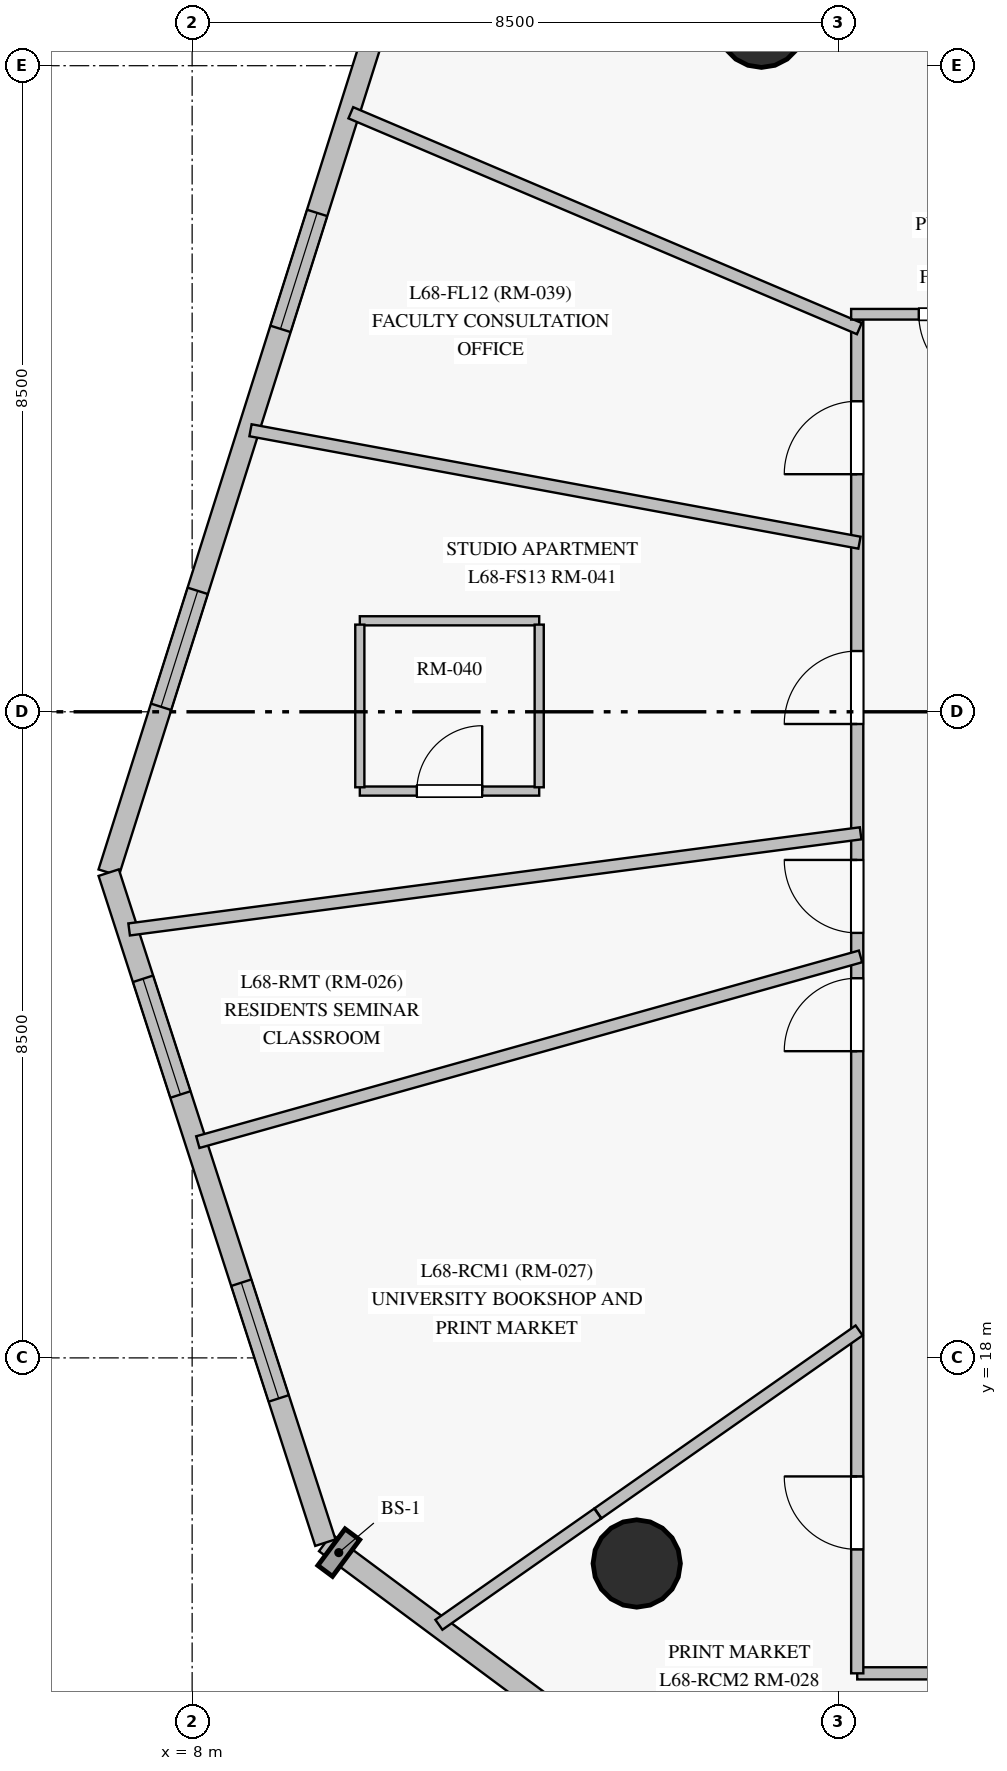
"""IFC4 building model, lengths in metres.
Left out: names, types, materials, properties, quantities, classifications, styles, units other than length and angle.
Written with IfcOpenShell. Run it as: python <this file> out.ifc"""

import sys

from ifc_helpers import new_model, si_unit, direction, frame, frame_2d, origin, origin_with_axes, origin_2d, place, context, subcontext, project, spatial, rectangle, circle, extrude, source, transform, mapped, element, fill, save


model = new_model("IFC4")
c1 = context("Model", 3, precision=1e-05, world=origin(), true_north=direction((0.0, 1.0)))
c2 = subcontext(c1, "Body", "Model", "MODEL_VIEW")
j1 = project(units=[si_unit("LENGTHUNIT", "METRE"), si_unit("PLANEANGLEUNIT", "RADIAN")], contexts=[c1])
p1 = place(None, origin())
s1 = spatial("IfcSite", under=j1, at=p1, CompositionType="ELEMENT")
p2 = place(p1, origin())
s2 = spatial("IfcBuilding", under=s1, at=p2, CompositionType="ELEMENT")
p3 = place(p2, frame((0.0, 0.0, 232.15)))
s3 = spatial("IfcBuildingStorey", under=s2, at=p3, CompositionType="ELEMENT", Elevation=232.15)
m1 = source(origin_with_axes(), c2, "Body", "SweptSolid", [
    extrude(circle(Radius=0.575, at=origin_2d()), origin(), (0.0, 0.0, 1.0), 3.05),
])
for number, where, z_axis, x_axis in (
    (1, (15.49, 35.552, 0.0), (0.0, 0.0, 1.0), (1.0, 0.0, 0.0)),
    (2, (13.849, 15.295, 0.0), (0.0, 0.0, 1.0), (1.0, 0.0, 0.0)),
):
    element("IfcColumn", number, at=place(p3, frame(where, z_axis=z_axis, x_axis=x_axis)), inside=s3, PredefinedType="COLUMN", context=c2, shape_type="MappedRepresentation", body=[
        mapped(m1, transform((0.0, 0.0, 0.0), scale=1.0)),
    ])
p4 = place(p3, frame((9.752, 15.569, 0.0), z_axis=(0.0, 0.0, 1.0), x_axis=(0.802568222185, -0.596560347944, 0.0)))
e3 = element("IfcWall", 3, at=p4, inside=s3, PredefinedType="SOLIDWALL", context=c2, shape_type="SweptSolid", body=[
    extrude(rectangle(XDim=12.342, YDim=0.28, at=frame_2d((6.171, 0.0))), origin(), (0.0, 0.0, 1.0), 2.85),
])
p5 = place(p4, frame((4.531, 0.0, 0.85)))
e4 = element("IfcOpeningElement", 4, at=p5, cuts=e3, PredefinedType="OPENING", context=c2, shape_type="SweptSolid", body=[
    extrude(rectangle(XDim=1.6, YDim=1.6, at=frame_2d((0.8, 0.8))), frame((0.0, 0.15, 0.0), z_axis=(0.0, -1.0, 0.0), x_axis=(1.0, 0.0, 0.0)), (0.0, 0.0, 1.0), 0.3),
])
p6 = place(p4, frame((9.744, 0.0, 0.85)))
e5 = element("IfcOpeningElement", 5, at=p6, cuts=e3, PredefinedType="OPENING", context=c2, shape_type="SweptSolid", body=[
    extrude(rectangle(XDim=1.6, YDim=1.6, at=frame_2d((0.8, 0.8))), frame((0.0, 0.15, 0.0), z_axis=(0.0, -1.0, 0.0), x_axis=(1.0, 0.0, 0.0)), (0.0, 0.0, 1.0), 0.3),
])
p7 = place(p3, frame((10.621, 36.152, 0.0), z_axis=(0.0, 0.0, 1.0), x_axis=(-0.301293253661, -0.953531528214, 0.0)))
e6 = element("IfcWall", 6, at=p7, inside=s3, PredefinedType="SOLIDWALL", context=c2, shape_type="SweptSolid", body=[
    extrude(rectangle(XDim=12.342, YDim=0.28, at=frame_2d((6.171, 0.0))), origin(), (0.0, 0.0, 1.0), 2.85),
])
p8 = place(p7, frame((3.239, 0.0, 0.85)))
e7 = element("IfcOpeningElement", 7, at=p8, cuts=e6, PredefinedType="OPENING", context=c2, shape_type="SweptSolid", body=[
    extrude(rectangle(XDim=1.6, YDim=1.6, at=frame_2d((0.8, 0.8))), frame((0.0, 0.15, 0.0), z_axis=(0.0, -1.0, 0.0), x_axis=(1.0, 0.0, 0.0)), (0.0, 0.0, 1.0), 0.3),
])
p9 = place(p7, frame((8.454, 0.0, 0.85)))
e8 = element("IfcOpeningElement", 8, at=p9, cuts=e6, PredefinedType="OPENING", context=c2, shape_type="SweptSolid", body=[
    extrude(rectangle(XDim=1.6, YDim=1.6, at=frame_2d((0.8, 0.8))), frame((0.0, 0.15, 0.0), z_axis=(0.0, -1.0, 0.0), x_axis=(1.0, 0.0, 0.0)), (0.0, 0.0, 1.0), 0.3),
])
p10 = place(p3, frame((6.902, 24.384, 0.0), z_axis=(0.0, 0.0, 1.0), x_axis=(0.307684157232, -0.951488549268, 0.0)))
e9 = element("IfcWall", 9, at=p10, inside=s3, PredefinedType="SOLIDWALL", context=c2, shape_type="SweptSolid", body=[
    extrude(rectangle(XDim=9.264, YDim=0.28, at=frame_2d((4.632, 0.0))), origin(), (0.0, 0.0, 1.0), 2.85),
])
p11 = place(p10, frame((1.468, 0.0, 0.85)))
e10 = element("IfcOpeningElement", 10, at=p11, cuts=e9, PredefinedType="OPENING", context=c2, shape_type="SweptSolid", body=[
    extrude(rectangle(XDim=1.6, YDim=1.6, at=frame_2d((0.8, 0.8))), frame((0.0, 0.15, 0.0), z_axis=(0.0, -1.0, 0.0), x_axis=(1.0, 0.0, 0.0)), (0.0, 0.0, 1.0), 0.3),
])
p12 = place(p10, frame((5.67, 0.0, 0.85)))
e11 = element("IfcOpeningElement", 11, at=p12, cuts=e9, PredefinedType="OPENING", context=c2, shape_type="SweptSolid", body=[
    extrude(rectangle(XDim=1.6, YDim=1.6, at=frame_2d((0.8, 0.8))), frame((0.0, 0.15, 0.0), z_axis=(0.0, -1.0, 0.0), x_axis=(1.0, 0.0, 0.0)), (0.0, 0.0, 1.0), 0.3),
])
p13 = place(p3, frame((39.82, 13.85, 0.0), z_axis=(0.0, 0.0, 1.0), x_axis=(-1.0, 0.0, 0.0)))
e12 = element("IfcWall", 12, at=p13, inside=s3, PredefinedType="PARTITIONING", context=c2, shape_type="SweptSolid", body=[
    extrude(rectangle(XDim=23.07, YDim=0.16, at=frame_2d((11.535, 0.0))), origin(), (0.0, 0.0, 1.0), 2.3),
])
p14 = place(p13, frame((14.423, 0.0, 0.0)))
e13 = element("IfcOpeningElement", 13, at=p14, cuts=e12, PredefinedType="OPENING", context=c2, shape_type="SweptSolid", body=[
    extrude(rectangle(XDim=0.96, YDim=2.15, at=frame_2d((0.48, 1.075))), frame((0.0, 0.09, 0.0), z_axis=(0.0, -1.0, 0.0), x_axis=(1.0, 0.0, 0.0)), (0.0, 0.0, 1.0), 0.18),
])
p15 = place(p13, frame((10.985, 0.0, 0.0)))
e14 = element("IfcOpeningElement", 14, at=p15, cuts=e12, PredefinedType="OPENING", context=c2, shape_type="SweptSolid", body=[
    extrude(rectangle(XDim=0.96, YDim=2.15, at=frame_2d((0.48, 1.075))), frame((0.0, 0.09, 0.0), z_axis=(0.0, -1.0, 0.0), x_axis=(1.0, 0.0, 0.0)), (0.0, 0.0, 1.0), 0.18),
])
p16 = place(p13, frame((5.255, 0.0, 0.0)))
e15 = element("IfcOpeningElement", 15, at=p16, cuts=e12, PredefinedType="OPENING", context=c2, shape_type="SweptSolid", body=[
    extrude(rectangle(XDim=0.96, YDim=2.15, at=frame_2d((0.48, 1.075))), frame((0.0, 0.09, 0.0), z_axis=(0.0, -1.0, 0.0), x_axis=(1.0, 0.0, 0.0)), (0.0, 0.0, 1.0), 0.18),
])
p17 = place(p3, frame((16.75, 13.85, 0.0), z_axis=(0.0, 0.0, 1.0), x_axis=(0.0, 1.0, 0.0)))
e16 = element("IfcWall", 16, at=p17, inside=s3, PredefinedType="PARTITIONING", context=c2, shape_type="SweptSolid", body=[
    extrude(rectangle(XDim=17.8, YDim=0.16, at=frame_2d((8.9, 0.0))), origin(), (0.0, 0.0, 1.0), 2.45),
])
p18 = place(p17, frame((12.49, 0.0, 0.0)))
e17 = element("IfcOpeningElement", 17, at=p18, cuts=e16, PredefinedType="OPENING", context=c2, shape_type="SweptSolid", body=[
    extrude(rectangle(XDim=0.96, YDim=2.15, at=frame_2d((0.48, 1.075))), frame((0.0, 0.09, 0.0), z_axis=(0.0, -1.0, 0.0), x_axis=(1.0, 0.0, 0.0)), (0.0, 0.0, 1.0), 0.18),
])
p19 = place(p17, frame((9.741, 0.0, 0.0)))
e18 = element("IfcOpeningElement", 18, at=p19, cuts=e16, PredefinedType="OPENING", context=c2, shape_type="SweptSolid", body=[
    extrude(rectangle(XDim=0.96, YDim=2.15, at=frame_2d((0.48, 1.075))), frame((0.0, 0.09, 0.0), z_axis=(0.0, -1.0, 0.0), x_axis=(1.0, 0.0, 0.0)), (0.0, 0.0, 1.0), 0.18),
])
p20 = place(p17, frame((8.185, 0.0, 0.0)))
e19 = element("IfcOpeningElement", 19, at=p20, cuts=e16, PredefinedType="OPENING", context=c2, shape_type="SweptSolid", body=[
    extrude(rectangle(XDim=0.96, YDim=2.15, at=frame_2d((0.48, 1.075))), frame((0.0, 0.09, 0.0), z_axis=(0.0, -1.0, 0.0), x_axis=(1.0, 0.0, 0.0)), (0.0, 0.0, 1.0), 0.18),
])
p21 = place(p17, frame((1.631, 0.0, 0.0)))
e20 = element("IfcOpeningElement", 20, at=p21, cuts=e16, PredefinedType="OPENING", context=c2, shape_type="SweptSolid", body=[
    extrude(rectangle(XDim=0.96, YDim=2.15, at=frame_2d((0.48, 1.075))), frame((0.0, 0.09, 0.0), z_axis=(0.0, -1.0, 0.0), x_axis=(1.0, 0.0, 0.0)), (0.0, 0.0, 1.0), 0.18),
])
p22 = place(p17, frame((15.776, 0.0, 0.0)))
e21 = element("IfcOpeningElement", 21, at=p22, cuts=e16, PredefinedType="OPENING", context=c2, shape_type="SweptSolid", body=[
    extrude(rectangle(XDim=0.96, YDim=2.15, at=frame_2d((0.48, 1.075))), frame((0.0, 0.09, 0.0), z_axis=(0.0, -1.0, 0.0), x_axis=(1.0, 0.0, 0.0)), (0.0, 0.0, 1.0), 0.18),
])
p23 = place(p3, frame((7.171, 23.637, 0.0), z_axis=(0.0, 0.0, 1.0), x_axis=(0.991475685251, 0.130291847623, 0.0)))
e22 = element("IfcWall", 22, at=p23, inside=s3, PredefinedType="PARTITIONING", context=c2, shape_type="SweptSolid", body=[
    extrude(rectangle(XDim=9.706, YDim=0.16, at=frame_2d((4.853, 0.0))), origin(), (0.0, 0.0, 1.0), 2.85),
])
p24 = place(p3, frame((16.793, 23.282, 0.0), z_axis=(0.0, 0.0, 1.0), x_axis=(-0.962908551291, -0.269827948609, 0.0)))
e23 = element("IfcWall", 23, at=p24, inside=s3, PredefinedType="PARTITIONING", context=c2, shape_type="SweptSolid", body=[
    extrude(rectangle(XDim=9.054, YDim=0.16, at=frame_2d((4.527, 0.0))), origin(), (0.0, 0.0, 1.0), 2.85),
])
p25 = place(p3, frame((16.78, 28.725, 0.0), z_axis=(0.0, 0.0, 1.0), x_axis=(-0.983383991092, 0.181537671198, 0.0)))
e24 = element("IfcWall", 24, at=p25, inside=s3, PredefinedType="PARTITIONING", context=c2, shape_type="SweptSolid", body=[
    extrude(rectangle(XDim=8.147, YDim=0.16, at=frame_2d((4.073, 0.0))), origin(), (0.0, 0.0, 1.0), 2.85),
])
p26 = place(p3, frame((16.778, 31.541, 0.0), z_axis=(0.0, 0.0, 1.0), x_axis=(-0.920503444572, 0.390734447588, 0.0)))
e25 = element("IfcWall", 25, at=p26, inside=s3, PredefinedType="PARTITIONING", context=c2, shape_type="SweptSolid", body=[
    extrude(rectangle(XDim=7.268, YDim=0.16, at=frame_2d((3.634, 0.0))), origin(), (0.0, 0.0, 1.0), 2.85),
])
p27 = place(p3, frame((19.373, 13.875, 0.0), z_axis=(0.0, 0.0, 1.0), x_axis=(-0.582738076312, -0.812660036188, 0.0)))
e26 = element("IfcWall", 26, at=p27, inside=s3, PredefinedType="PARTITIONING", context=c2, shape_type="SweptSolid", body=[
    extrude(rectangle(XDim=4.354, YDim=0.16, at=frame_2d((2.177, 0.0))), origin(), (0.0, 0.0, 1.0), 2.85),
])
p28 = place(p3, frame((16.775, 18.361, 0.0), z_axis=(0.0, 0.0, 1.0), x_axis=(-0.819095148896, -0.573657682816, 0.0)))
e27 = element("IfcWall", 27, at=p28, inside=s3, PredefinedType="PARTITIONING", context=c2, shape_type="SweptSolid", body=[
    extrude(rectangle(XDim=4.194, YDim=0.16, at=frame_2d((2.097, 0.0))), origin(), (0.0, 0.0, 1.0), 2.85),
])
p29 = place(p3, frame((19.42, 31.73, 0.0), z_axis=(0.0, 0.0, 1.0), x_axis=(-1.0, 0.0, 0.0)))
e28 = element("IfcWall", 28, at=p29, inside=s3, PredefinedType="PARTITIONING", context=c2, shape_type="SweptSolid", body=[
    extrude(rectangle(XDim=2.75, YDim=0.14, at=frame_2d((1.375, 0.0))), origin(), (0.0, 0.0, 1.0), 2.85),
])
p30 = place(p29, frame((0.9, 0.0, 0.0)))
e29 = element("IfcOpeningElement", 29, at=p30, cuts=e28, PredefinedType="OPENING", context=c2, shape_type="SweptSolid", body=[
    extrude(rectangle(XDim=0.96, YDim=2.15, at=frame_2d((0.48, 1.075))), frame((0.0, 0.08, 0.0), z_axis=(0.0, -1.0, 0.0), x_axis=(1.0, 0.0, 0.0)), (0.0, 0.0, 1.0), 0.16),
])
p31 = place(p3, frame((10.206, 25.457, 0.0), z_axis=(0.0, 0.0, 1.0), x_axis=(1.0, 0.0, 0.0)))
e30 = element("IfcWall", 30, at=p31, inside=s3, PredefinedType="PARTITIONING", context=c2, shape_type="SweptSolid", body=[
    extrude(rectangle(XDim=2.36, YDim=0.12, at=frame_2d((1.18, 0.0))), origin(), (0.0, 0.0, 1.0), 2.85),
])
p32 = place(p31, frame((0.75, 0.0, 0.0)))
e31 = element("IfcOpeningElement", 31, at=p32, cuts=e30, PredefinedType="OPENING", context=c2, shape_type="SweptSolid", body=[
    extrude(rectangle(XDim=0.86, YDim=2.1, at=frame_2d((0.43, 1.05))), frame((0.0, 0.07, 0.0), z_axis=(0.0, -1.0, 0.0), x_axis=(1.0, 0.0, 0.0)), (0.0, 0.0, 1.0), 0.14),
])
p33 = place(p3, frame((12.566, 27.697, 0.0), z_axis=(0.0, 0.0, 1.0), x_axis=(-1.0, 0.0, 0.0)))
e32 = element("IfcWall", 32, at=p33, inside=s3, PredefinedType="PARTITIONING", context=c2, shape_type="SweptSolid", body=[
    extrude(rectangle(XDim=2.36, YDim=0.12, at=frame_2d((1.18, 0.0))), origin(), (0.0, 0.0, 1.0), 2.85),
])
p34 = place(p3, frame((13.335, 15.952, 0.0), z_axis=(0.0, 0.0, 1.0), x_axis=(-0.819060984625, -0.573706461063, 0.0)))
e33 = element("IfcWall", 33, at=p34, inside=s3, PredefinedType="PARTITIONING", context=c2, shape_type="SweptSolid", body=[
    extrude(rectangle(XDim=2.55, YDim=0.16, at=frame_2d((1.275, 0.0))), origin(), (0.0, 0.0, 1.0), 2.85),
])
for number, where, z_axis, x_axis in (
    (34, (12.566, 25.507, 0.0), (0.0, 0.0, 1.0), (0.0, 1.0, 0.0)),
    (35, (10.206, 27.647, 0.0), (0.0, 0.0, 1.0), (0.0, -1.0, 0.0)),
):
    element("IfcWall", number, at=place(p3, frame(where, z_axis=z_axis, x_axis=x_axis)), inside=s3, PredefinedType="PARTITIONING", context=c2, shape_type="SweptSolid", body=[
        extrude(rectangle(XDim=2.14, YDim=0.12, at=frame_2d((1.07, 0.0))), origin(), (0.0, 0.0, 1.0), 2.85),
    ])
m2 = source(origin_with_axes(), c2, "Body", "SweptSolid", [
    extrude(rectangle(XDim=1.6, YDim=1.6, at=frame_2d((0.8, 0.8))), frame((0.0, 0.03, 0.0), z_axis=(0.0, -1.0, 0.0), x_axis=(1.0, 0.0, 0.0)), (0.0, 0.0, 1.0), 0.06),
])
p35 = place(p8, origin())
e36 = element("IfcWindow", 36, at=p35, inside=s3, PartitioningType="SINGLE_PANEL", PredefinedType="WINDOW", context=c2, shape_type="MappedRepresentation", body=[
    mapped(m2, transform((0.0, 0.0, 0.0), scale=1.0)),
])
fill(e7, e36)
p36 = place(p9, origin())
e37 = element("IfcWindow", 37, at=p36, inside=s3, PartitioningType="SINGLE_PANEL", PredefinedType="WINDOW", context=c2, shape_type="MappedRepresentation", body=[
    mapped(m2, transform((0.0, 0.0, 0.0), scale=1.0)),
])
fill(e8, e37)
p37 = place(p11, origin())
e38 = element("IfcWindow", 38, at=p37, inside=s3, PartitioningType="SINGLE_PANEL", PredefinedType="WINDOW", context=c2, shape_type="MappedRepresentation", body=[
    mapped(m2, transform((0.0, 0.0, 0.0), scale=1.0)),
])
fill(e10, e38)
p38 = place(p12, origin())
e39 = element("IfcWindow", 39, at=p38, inside=s3, PartitioningType="SINGLE_PANEL", PredefinedType="WINDOW", context=c2, shape_type="MappedRepresentation", body=[
    mapped(m2, transform((0.0, 0.0, 0.0), scale=1.0)),
])
fill(e11, e39)
m3 = source(origin_with_axes(), c2, "Body", "SweptSolid", [
    extrude(rectangle(XDim=0.96, YDim=2.15, at=frame_2d((0.48, 1.075))), frame((0.0, 0.025, 0.0), z_axis=(0.0, -1.0, 0.0), x_axis=(1.0, 0.0, 0.0)), (0.0, 0.0, 1.0), 0.05),
])
p39 = place(p30, origin())
e40 = element("IfcDoor", 40, at=p39, inside=s3, OperationType="SINGLE_SWING_LEFT", PredefinedType="DOOR", context=c2, shape_type="MappedRepresentation", body=[
    mapped(m3, transform((0.0, 0.0, 0.0), scale=1.0)),
])
fill(e29, e40)
m4 = source(origin_with_axes(), c2, "Body", "SweptSolid", [
    extrude(rectangle(XDim=0.86, YDim=2.1, at=frame_2d((0.43, 1.05))), frame((0.0, 0.025, 0.0), z_axis=(0.0, -1.0, 0.0), x_axis=(1.0, 0.0, 0.0)), (0.0, 0.0, 1.0), 0.05),
])
p40 = place(p32, origin())
e41 = element("IfcDoor", 41, at=p40, inside=s3, OperationType="SINGLE_SWING_RIGHT", PredefinedType="DOOR", context=c2, shape_type="MappedRepresentation", body=[
    mapped(m4, transform((0.0, 0.0, 0.0), scale=1.0)),
])
fill(e31, e41)
p41 = place(p18, origin())
e42 = element("IfcDoor", 42, at=p41, inside=s3, OperationType="SINGLE_SWING_LEFT", PredefinedType="DOOR", context=c2, shape_type="MappedRepresentation", body=[
    mapped(m3, transform((0.0, 0.0, 0.0), scale=1.0)),
])
fill(e17, e42)
p42 = place(p19, origin())
e43 = element("IfcDoor", 43, at=p42, inside=s3, OperationType="SINGLE_SWING_RIGHT", PredefinedType="DOOR", context=c2, shape_type="MappedRepresentation", body=[
    mapped(m3, transform((0.0, 0.0, 0.0), scale=1.0)),
])
fill(e18, e43)
p43 = place(p20, origin())
e44 = element("IfcDoor", 44, at=p43, inside=s3, OperationType="SINGLE_SWING_LEFT", PredefinedType="DOOR", context=c2, shape_type="MappedRepresentation", body=[
    mapped(m3, transform((0.0, 0.0, 0.0), scale=1.0)),
])
fill(e19, e44)
p44 = place(p21, origin())
e45 = element("IfcDoor", 45, at=p44, inside=s3, OperationType="SINGLE_SWING_RIGHT", PredefinedType="DOOR", context=c2, shape_type="MappedRepresentation", body=[
    mapped(m3, transform((0.0, 0.0, 0.0), scale=1.0)),
])
fill(e20, e45)
p45 = place(p22, origin())
e46 = element("IfcDoor", 46, at=p45, inside=s3, OperationType="SINGLE_SWING_LEFT", PredefinedType="DOOR", context=c2, shape_type="MappedRepresentation", body=[
    mapped(m3, transform((0.0, 0.0, 0.0), scale=1.0)),
])
fill(e21, e46)
save(model, sys.argv[1])
